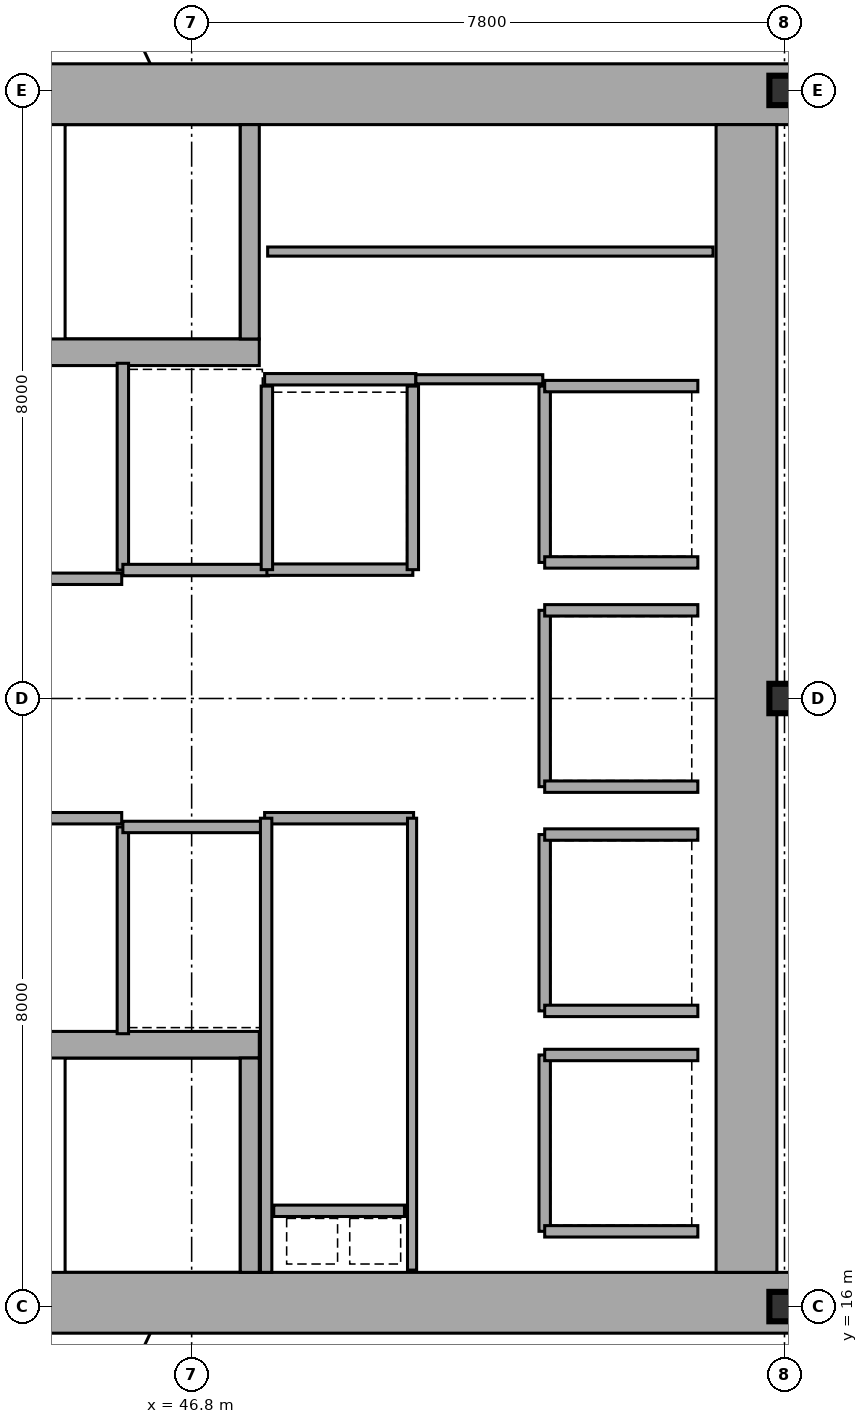
"""IFC4 building model, lengths in metres.
Left out: names, types, materials, properties, quantities, classifications, styles, units other than length and angle.
Written with IfcOpenShell. Run it as: python <this file> out.ifc"""

import sys

from ifc_helpers import new_model, si_unit, direction, frame, frame_2d, origin, origin_2d, place, context, subcontext, project, spatial, rectangle, i_section, extrude, element, fill, save


model = new_model("IFC4")
c1 = context("Model", 3, precision=1e-05, world=origin(), true_north=direction((0.0, 1.0)))
c2 = subcontext(c1, "Body", "Model", "MODEL_VIEW")
j1 = project(units=[si_unit("LENGTHUNIT", "METRE"), si_unit("PLANEANGLEUNIT", "RADIAN")], contexts=[c1])
p1 = place(None, origin())
s1 = spatial("IfcSite", under=j1, at=p1, CompositionType="ELEMENT")
p2 = place(p1, origin())
s2 = spatial("IfcBuilding", under=s1, at=p2, CompositionType="ELEMENT")
p3 = place(p2, frame((0.0, 0.0, 112.05)))
s3 = spatial("IfcBuildingStorey", under=s2, at=p3, CompositionType="ELEMENT", Elevation=112.05)
for number, where, z_axis, x_axis in (
    (1, (38.8, 31.95, 0.0), (0.0, 0.0, 1.0), (1.0, 0.0, 0.0)),
    (2, (38.8, 16.05, 0.0), (0.0, 0.0, 1.0), (1.0, 0.0, 0.0)),
):
    element("IfcWall", number, at=place(p3, frame(where, z_axis=z_axis, x_axis=x_axis)), inside=s3, PredefinedType="SHEAR", context=c2, shape_type="SweptSolid", body=[
        extrude(rectangle(XDim=16.0, YDim=0.8, at=frame_2d((8.0, 0.0))), origin(), (0.0, 0.0, 1.0), 4.56),
    ])
p4 = place(p3, frame((54.1, 16.45, 0.0), z_axis=(0.0, 0.0, 1.0), x_axis=(0.0, 1.0, 0.0)))
e3 = element("IfcWall", 3, at=p4, inside=s3, PredefinedType="SHEAR", context=c2, shape_type="SweptSolid", body=[
    extrude(rectangle(XDim=15.1, YDim=0.8, at=frame_2d((7.55, 0.0))), origin(), (0.0, 0.0, 1.0), 4.56),
])
p5 = place(p3, frame((39.98, 28.555, 0.0), z_axis=(0.0, 0.0, 1.0), x_axis=(1.0, 0.0, 0.0)))
e4 = element("IfcWall", 4, at=p5, inside=s3, PredefinedType="SHEAR", context=c2, shape_type="SweptSolid", body=[
    extrude(rectangle(XDim=7.71, YDim=0.35, at=frame_2d((3.855, 0.0))), origin(), (0.0, 0.0, 1.0), 4.56),
])
p6 = place(p5, frame((0.25, 0.0, 0.0)))
e5 = element("IfcOpeningElement", 5, at=p6, cuts=e4, PredefinedType="OPENING", context=c2, shape_type="SweptSolid", body=[
    extrude(rectangle(XDim=1.1, YDim=2.15, at=frame_2d((0.55, 1.075))), frame((0.0, 0.185, 0.0), z_axis=(0.0, -1.0, 0.0), x_axis=(1.0, 0.0, 0.0)), (0.0, 0.0, 1.0), 0.37),
])
p7 = place(p3, frame((39.98, 19.445, 0.0), z_axis=(0.0, 0.0, 1.0), x_axis=(1.0, 0.0, 0.0)))
e6 = element("IfcWall", 6, at=p7, inside=s3, PredefinedType="SHEAR", context=c2, shape_type="SweptSolid", body=[
    extrude(rectangle(XDim=7.71, YDim=0.35, at=frame_2d((3.855, 0.0))), origin(), (0.0, 0.0, 1.0), 4.56),
])
p8 = place(p7, frame((0.25, 0.0, 0.0)))
e7 = element("IfcOpeningElement", 7, at=p8, cuts=e6, PredefinedType="OPENING", context=c2, shape_type="SweptSolid", body=[
    extrude(rectangle(XDim=1.1, YDim=2.15, at=frame_2d((0.55, 1.075))), frame((0.0, 0.185, 0.0), z_axis=(0.0, -1.0, 0.0), x_axis=(1.0, 0.0, 0.0)), (0.0, 0.0, 1.0), 0.37),
])
for number, where, z_axis, x_axis in (
    (8, (47.565, 28.73, 0.0), (0.0, 0.0, 1.0), (0.0, 1.0, 0.0)),
    (9, (47.565, 16.45, 0.0), (0.0, 0.0, 1.0), (0.0, 1.0, 0.0)),
):
    element("IfcWall", number, at=place(p3, frame(where, z_axis=z_axis, x_axis=x_axis)), inside=s3, PredefinedType="SHEAR", context=c2, shape_type="SweptSolid", body=[
        extrude(rectangle(XDim=2.82, YDim=0.25, at=frame_2d((1.41, 0.0))), origin(), (0.0, 0.0, 1.0), 4.56),
    ])
for number, where, z_axis, x_axis in (
    (10, (54.6, 16.0, 0.0), (0.0, 0.0, 1.0), (1.0, 0.0, 0.0)),
    (11, (54.6, 24.0, 0.0), (0.0, 0.0, 1.0), (1.0, 0.0, 0.0)),
    (12, (54.6, 32.0, 0.0), (0.0, 0.0, 1.0), (1.0, 0.0, 0.0)),
):
    element("IfcColumn", number, at=place(p3, frame(where, z_axis=z_axis, x_axis=x_axis)), inside=s3, PredefinedType="COLUMN", context=c2, shape_type="SweptSolid", body=[
        extrude(i_section(OverallWidth=0.398, OverallDepth=0.387, WebThickness=0.021, FlangeThickness=0.033, at=origin_2d()), origin(), (0.0, 0.0, 1.0), 4.794),
    ])
p9 = place(p3, frame((39.98, 25.575, 0.0), z_axis=(0.0, 0.0, 1.0), x_axis=(1.0, 0.0, 0.0)))
e13 = element("IfcWall", 13, at=p9, inside=s3, PredefinedType="PARTITIONING", context=c2, shape_type="SweptSolid", body=[
    extrude(rectangle(XDim=5.9, YDim=0.15, at=frame_2d((2.95, 0.0))), origin(), (0.0, 0.0, 1.0), 4.56),
])
p10 = place(p9, frame((2.35, 0.0, 0.0)))
e14 = element("IfcOpeningElement", 14, at=p10, cuts=e13, PredefinedType="OPENING", context=c2, shape_type="SweptSolid", body=[
    extrude(rectangle(XDim=1.05, YDim=2.15, at=frame_2d((0.525, 1.075))), frame((0.0, 0.085, 0.0), z_axis=(0.0, -1.0, 0.0), x_axis=(1.0, 0.0, 0.0)), (0.0, 0.0, 1.0), 0.17),
])
p11 = place(p3, frame((39.98, 22.425, 0.0), z_axis=(0.0, 0.0, 1.0), x_axis=(1.0, 0.0, 0.0)))
e15 = element("IfcWall", 15, at=p11, inside=s3, PredefinedType="PARTITIONING", context=c2, shape_type="SweptSolid", body=[
    extrude(rectangle(XDim=5.9, YDim=0.15, at=frame_2d((2.95, 0.0))), origin(), (0.0, 0.0, 1.0), 4.56),
])
p12 = place(p11, frame((2.35, 0.0, 0.0)))
e16 = element("IfcOpeningElement", 16, at=p12, cuts=e15, PredefinedType="OPENING", context=c2, shape_type="SweptSolid", body=[
    extrude(rectangle(XDim=1.05, YDim=2.15, at=frame_2d((0.525, 1.075))), frame((0.0, 0.085, 0.0), z_axis=(0.0, -1.0, 0.0), x_axis=(1.0, 0.0, 0.0)), (0.0, 0.0, 1.0), 0.17),
])
p13 = place(p3, frame((45.895, 25.69, 0.0), z_axis=(0.0, 0.0, 1.0), x_axis=(0.0, 1.0, 0.0)))
e17 = element("IfcWall", 17, at=p13, inside=s3, PredefinedType="PARTITIONING", context=c2, shape_type="SweptSolid", body=[
    extrude(rectangle(XDim=2.72, YDim=0.15, at=frame_2d((1.36, 0.0))), origin(), (0.0, 0.0, 1.0), 4.56),
])
p14 = place(p13, frame((0.81, 0.0, 0.0)))
e18 = element("IfcOpeningElement", 18, at=p14, cuts=e17, PredefinedType="OPENING", context=c2, shape_type="SweptSolid", body=[
    extrude(rectangle(XDim=1.1, YDim=2.15, at=frame_2d((0.55, 1.075))), frame((0.0, 0.085, 0.0), z_axis=(0.0, -1.0, 0.0), x_axis=(1.0, 0.0, 0.0)), (0.0, 0.0, 1.0), 0.17),
])
p15 = place(p3, frame((45.895, 25.69, 0.0), z_axis=(0.0, 0.0, 1.0), x_axis=(1.0, 0.0, 0.0)))
e19 = element("IfcWall", 19, at=p15, inside=s3, PredefinedType="PARTITIONING", context=c2, shape_type="SweptSolid", body=[
    extrude(rectangle(XDim=1.915, YDim=0.15, at=frame_2d((0.958, 0.0))), origin(), (0.0, 0.0, 1.0), 4.56),
])
p16 = place(p3, frame((45.895, 19.59, 0.0), z_axis=(0.0, 0.0, 1.0), x_axis=(0.0, 1.0, 0.0)))
e20 = element("IfcWall", 20, at=p16, inside=s3, PredefinedType="PARTITIONING", context=c2, shape_type="SweptSolid", body=[
    extrude(rectangle(XDim=2.72, YDim=0.15, at=frame_2d((1.36, 0.0))), origin(), (0.0, 0.0, 1.0), 4.56),
])
p17 = place(p16, frame((0.81, 0.0, 0.0)))
e21 = element("IfcOpeningElement", 21, at=p17, cuts=e20, PredefinedType="OPENING", context=c2, shape_type="SweptSolid", body=[
    extrude(rectangle(XDim=1.1, YDim=2.15, at=frame_2d((0.55, 1.075))), frame((0.0, 0.085, 0.0), z_axis=(0.0, -1.0, 0.0), x_axis=(1.0, 0.0, 0.0)), (0.0, 0.0, 1.0), 0.17),
])
p18 = place(p3, frame((45.895, 22.31, 0.0), z_axis=(0.0, 0.0, 1.0), x_axis=(1.0, 0.0, 0.0)))
e22 = element("IfcWall", 22, at=p18, inside=s3, PredefinedType="PARTITIONING", context=c2, shape_type="SweptSolid", body=[
    extrude(rectangle(XDim=1.915, YDim=0.15, at=frame_2d((0.958, 0.0))), origin(), (0.0, 0.0, 1.0), 4.56),
])
p19 = place(p3, frame((47.79, 25.695, 0.0), z_axis=(0.0, 0.0, 1.0), x_axis=(1.0, 0.0, 0.0)))
e23 = element("IfcWall", 23, at=p19, inside=s3, PredefinedType="PARTITIONING", context=c2, shape_type="SweptSolid", body=[
    extrude(rectangle(XDim=1.92, YDim=0.15, at=frame_2d((0.96, 0.0))), origin(), (0.0, 0.0, 1.0), 4.56),
])
p20 = place(p19, frame((0.41, 0.0, 0.0)))
e24 = element("IfcOpeningElement", 24, at=p20, cuts=e23, PredefinedType="OPENING", context=c2, shape_type="SweptSolid", body=[
    extrude(rectangle(XDim=1.1, YDim=2.15, at=frame_2d((0.55, 1.075))), frame((0.0, 0.085, 0.0), z_axis=(0.0, -1.0, 0.0), x_axis=(1.0, 0.0, 0.0)), (0.0, 0.0, 1.0), 0.17),
])
for number, where, z_axis, x_axis in (
    (25, (47.79, 25.695, 0.0), (0.0, 0.0, 1.0), (0.0, 1.0, 0.0)),
    (26, (49.71, 25.695, 0.0), (0.0, 0.0, 1.0), (0.0, 1.0, 0.0)),
):
    element("IfcWall", number, at=place(p3, frame(where, z_axis=z_axis, x_axis=x_axis)), inside=s3, PredefinedType="PARTITIONING", context=c2, shape_type="SweptSolid", body=[
        extrude(rectangle(XDim=2.415, YDim=0.15, at=frame_2d((1.208, 0.0))), origin(), (0.0, 0.0, 1.0), 4.56),
    ])
p21 = place(p3, frame((51.445, 25.79, 0.0), z_axis=(0.0, 0.0, 1.0), x_axis=(0.0, 1.0, 0.0)))
e27 = element("IfcWall", 27, at=p21, inside=s3, PredefinedType="PARTITIONING", context=c2, shape_type="SweptSolid", body=[
    extrude(rectangle(XDim=2.32, YDim=0.15, at=frame_2d((1.16, 0.0))), origin(), (0.0, 0.0, 1.0), 4.56),
])
p22 = place(p21, frame((0.61, 0.0, 0.0)))
e28 = element("IfcOpeningElement", 28, at=p22, cuts=e27, PredefinedType="OPENING", context=c2, shape_type="SweptSolid", body=[
    extrude(rectangle(XDim=1.1, YDim=2.15, at=frame_2d((0.55, 1.075))), frame((0.0, 0.085, 0.0), z_axis=(0.0, -1.0, 0.0), x_axis=(1.0, 0.0, 0.0)), (0.0, 0.0, 1.0), 0.17),
])
for number, where, z_axis, x_axis in (
    (29, (51.445, 25.79, 0.0), (0.0, 0.0, 1.0), (1.0, 0.0, 0.0)),
    (30, (51.445, 28.11, 0.0), (0.0, 0.0, 1.0), (1.0, 0.0, 0.0)),
):
    element("IfcWall", number, at=place(p3, frame(where, z_axis=z_axis, x_axis=x_axis)), inside=s3, PredefinedType="PARTITIONING", context=c2, shape_type="SweptSolid", body=[
        extrude(rectangle(XDim=2.015, YDim=0.15, at=frame_2d((1.007, 0.0))), origin(), (0.0, 0.0, 1.0), 4.56),
    ])
p23 = place(p3, frame((51.445, 19.89, 0.0), z_axis=(0.0, 0.0, 1.0), x_axis=(0.0, 1.0, 0.0)))
e31 = element("IfcWall", 31, at=p23, inside=s3, PredefinedType="PARTITIONING", context=c2, shape_type="SweptSolid", body=[
    extrude(rectangle(XDim=2.32, YDim=0.15, at=frame_2d((1.16, 0.0))), origin(), (0.0, 0.0, 1.0), 4.56),
])
p24 = place(p23, frame((0.61, 0.0, 0.0)))
e32 = element("IfcOpeningElement", 32, at=p24, cuts=e31, PredefinedType="OPENING", context=c2, shape_type="SweptSolid", body=[
    extrude(rectangle(XDim=1.1, YDim=2.15, at=frame_2d((0.55, 1.075))), frame((0.0, 0.085, 0.0), z_axis=(0.0, -1.0, 0.0), x_axis=(1.0, 0.0, 0.0)), (0.0, 0.0, 1.0), 0.17),
])
for number, where, z_axis, x_axis in (
    (33, (51.445, 19.89, 0.0), (0.0, 0.0, 1.0), (1.0, 0.0, 0.0)),
    (34, (51.445, 22.21, 0.0), (0.0, 0.0, 1.0), (1.0, 0.0, 0.0)),
):
    element("IfcWall", number, at=place(p3, frame(where, z_axis=z_axis, x_axis=x_axis)), inside=s3, PredefinedType="PARTITIONING", context=c2, shape_type="SweptSolid", body=[
        extrude(rectangle(XDim=2.015, YDim=0.15, at=frame_2d((1.007, 0.0))), origin(), (0.0, 0.0, 1.0), 4.56),
    ])
p25 = place(p3, frame((51.445, 22.84, 0.0), z_axis=(0.0, 0.0, 1.0), x_axis=(0.0, 1.0, 0.0)))
e35 = element("IfcWall", 35, at=p25, inside=s3, PredefinedType="PARTITIONING", context=c2, shape_type="SweptSolid", body=[
    extrude(rectangle(XDim=2.32, YDim=0.15, at=frame_2d((1.16, 0.0))), origin(), (0.0, 0.0, 1.0), 4.56),
])
for number, where, z_axis, x_axis in (
    (36, (51.445, 22.84, 0.0), (0.0, 0.0, 1.0), (1.0, 0.0, 0.0)),
    (37, (51.445, 25.16, 0.0), (0.0, 0.0, 1.0), (1.0, 0.0, 0.0)),
):
    element("IfcWall", number, at=place(p3, frame(where, z_axis=z_axis, x_axis=x_axis)), inside=s3, PredefinedType="PARTITIONING", context=c2, shape_type="SweptSolid", body=[
        extrude(rectangle(XDim=2.015, YDim=0.15, at=frame_2d((1.007, 0.0))), origin(), (0.0, 0.0, 1.0), 4.56),
    ])
p26 = place(p3, frame((51.445, 16.99, 0.0), z_axis=(0.0, 0.0, 1.0), x_axis=(0.0, 1.0, 0.0)))
e38 = element("IfcWall", 38, at=p26, inside=s3, PredefinedType="PARTITIONING", context=c2, shape_type="SweptSolid", body=[
    extrude(rectangle(XDim=2.32, YDim=0.15, at=frame_2d((1.16, 0.0))), origin(), (0.0, 0.0, 1.0), 4.56),
])
p27 = place(p26, frame((0.61, 0.0, 0.0)))
e39 = element("IfcOpeningElement", 39, at=p27, cuts=e38, PredefinedType="OPENING", context=c2, shape_type="SweptSolid", body=[
    extrude(rectangle(XDim=1.1, YDim=2.15, at=frame_2d((0.55, 1.075))), frame((0.0, 0.085, 0.0), z_axis=(0.0, -1.0, 0.0), x_axis=(1.0, 0.0, 0.0)), (0.0, 0.0, 1.0), 0.17),
])
for number, where, z_axis, x_axis in (
    (40, (51.445, 16.99, 0.0), (0.0, 0.0, 1.0), (1.0, 0.0, 0.0)),
    (41, (51.445, 19.31, 0.0), (0.0, 0.0, 1.0), (1.0, 0.0, 0.0)),
):
    element("IfcWall", number, at=place(p3, frame(where, z_axis=z_axis, x_axis=x_axis)), inside=s3, PredefinedType="PARTITIONING", context=c2, shape_type="SweptSolid", body=[
        extrude(rectangle(XDim=2.015, YDim=0.15, at=frame_2d((1.007, 0.0))), origin(), (0.0, 0.0, 1.0), 4.56),
    ])
p28 = place(p3, frame((47.88, 17.26, 0.0), z_axis=(0.0, 0.0, 1.0), x_axis=(1.0, 0.0, 0.0)))
e42 = element("IfcWall", 42, at=p28, inside=s3, PredefinedType="PARTITIONING", context=c2, shape_type="SweptSolid", body=[
    extrude(rectangle(XDim=1.72, YDim=0.15, at=frame_2d((0.86, 0.0))), origin(), (0.0, 0.0, 1.0), 4.56),
])
p29 = place(p28, frame((0.42, 0.0, 0.0)))
e43 = element("IfcOpeningElement", 43, at=p29, cuts=e42, PredefinedType="OPENING", context=c2, shape_type="SweptSolid", body=[
    extrude(rectangle(XDim=0.85, YDim=2.15, at=frame_2d((0.425, 1.075))), frame((0.0, 0.085, 0.0), z_axis=(0.0, -1.0, 0.0), x_axis=(1.0, 0.0, 0.0)), (0.0, 0.0, 1.0), 0.17),
])
p30 = place(p3, frame((47.76, 22.425, 0.0), z_axis=(0.0, 0.0, 1.0), x_axis=(1.0, 0.0, 0.0)))
e44 = element("IfcWall", 44, at=p30, inside=s3, PredefinedType="PARTITIONING", context=c2, shape_type="SweptSolid", body=[
    extrude(rectangle(XDim=1.96, YDim=0.15, at=frame_2d((0.98, 0.0))), origin(), (0.0, 0.0, 1.0), 4.56),
])
p31 = place(p3, frame((47.78, 16.45, 0.0), z_axis=(0.0, 0.0, 1.0), x_axis=(0.0, 1.0, 0.0)))
e45 = element("IfcWall", 45, at=p31, inside=s3, PredefinedType="PARTITIONING", context=c2, shape_type="SweptSolid", body=[
    extrude(rectangle(XDim=5.975, YDim=0.15, at=frame_2d((2.988, 0.0))), origin(), (0.0, 0.0, 1.0), 4.56),
])
p32 = place(p3, frame((49.7, 16.48, 0.0), z_axis=(0.0, 0.0, 1.0), x_axis=(0.0, 1.0, 0.0)))
e46 = element("IfcWall", 46, at=p32, inside=s3, PredefinedType="PARTITIONING", context=c2, shape_type="SweptSolid", body=[
    extrude(rectangle(XDim=5.945, YDim=0.12, at=frame_2d((2.973, 0.0))), origin(), (0.0, 0.0, 1.0), 4.56),
])
p33 = place(p32, frame((3.35, 0.0, 0.0)))
e47 = element("IfcOpeningElement", 47, at=p33, cuts=e46, PredefinedType="OPENING", context=c2, shape_type="SweptSolid", body=[
    extrude(rectangle(XDim=0.95, YDim=2.15, at=frame_2d((0.475, 1.075))), frame((0.0, 0.07, 0.0), z_axis=(0.0, -1.0, 0.0), x_axis=(1.0, 0.0, 0.0)), (0.0, 0.0, 1.0), 0.14),
])
p34 = place(p3, frame((47.76, 28.2, 0.0), z_axis=(0.0, 0.0, 1.0), x_axis=(1.0, 0.0, 0.0)))
e48 = element("IfcWall", 48, at=p34, inside=s3, PredefinedType="PARTITIONING", context=c2, shape_type="SweptSolid", body=[
    extrude(rectangle(XDim=1.99, YDim=0.15, at=frame_2d((0.995, 0.0))), origin(), (0.0, 0.0, 1.0), 4.56),
])
p35 = place(p3, frame((49.75, 28.2, 0.0), z_axis=(0.0, 0.0, 1.0), x_axis=(1.0, 0.0, 0.0)))
e49 = element("IfcWall", 49, at=p35, inside=s3, PredefinedType="PARTITIONING", context=c2, shape_type="SweptSolid", body=[
    extrude(rectangle(XDim=1.67, YDim=0.12, at=frame_2d((0.835, 0.0))), origin(), (0.0, 0.0, 1.0), 4.56),
])
p36 = place(p35, frame((0.42, 0.0, 0.0)))
e50 = element("IfcOpeningElement", 50, at=p36, cuts=e49, PredefinedType="OPENING", context=c2, shape_type="SweptSolid", body=[
    extrude(rectangle(XDim=0.85, YDim=2.15, at=frame_2d((0.425, 1.075))), frame((0.0, 0.07, 0.0), z_axis=(0.0, -1.0, 0.0), x_axis=(1.0, 0.0, 0.0)), (0.0, 0.0, 1.0), 0.14),
])
p37 = place(p3, frame((47.8, 29.88, 0.0), z_axis=(0.0, 0.0, 1.0), x_axis=(1.0, 0.0, 0.0)))
e51 = element("IfcWall", 51, at=p37, inside=s3, PredefinedType="PARTITIONING", context=c2, shape_type="SweptSolid", body=[
    extrude(rectangle(XDim=5.86, YDim=0.12, at=frame_2d((2.93, 0.0))), origin(), (0.0, 0.0, 1.0), 4.56),
])
p38 = place(p37, frame((2.5, 0.0, 0.0)))
e52 = element("IfcOpeningElement", 52, at=p38, cuts=e51, PredefinedType="OPENING", context=c2, shape_type="SweptSolid", body=[
    extrude(rectangle(XDim=0.85, YDim=2.15, at=frame_2d((0.425, 1.075))), frame((0.0, 0.07, 0.0), z_axis=(0.0, -1.0, 0.0), x_axis=(1.0, 0.0, 0.0)), (0.0, 0.0, 1.0), 0.14),
])
p39 = place(p14, frame((1.1, 0.0, 0.0), z_axis=(0.0, 0.0, 1.0), x_axis=(-1.0, 0.0, 0.0)))
e53 = element("IfcDoor", 53, at=p39, inside=s3, OperationType="DOUBLE_DOOR_SLIDING", PredefinedType="DOOR", context=c2, shape_type="SweptSolid", body=[
    extrude(rectangle(XDim=1.1, YDim=2.15, at=frame_2d((0.55, 1.075))), frame((0.0, 0.025, 0.0), z_axis=(0.0, -1.0, 0.0), x_axis=(1.0, 0.0, 0.0)), (0.0, 0.0, 1.0), 0.05),
])
fill(e18, e53)
p40 = place(p17, frame((1.1, 0.0, 0.0), z_axis=(0.0, 0.0, 1.0), x_axis=(-1.0, 0.0, 0.0)))
e54 = element("IfcDoor", 54, at=p40, inside=s3, OperationType="DOUBLE_DOOR_SLIDING", PredefinedType="DOOR", context=c2, shape_type="SweptSolid", body=[
    extrude(rectangle(XDim=1.1, YDim=2.15, at=frame_2d((0.55, 1.075))), frame((0.0, 0.025, 0.0), z_axis=(0.0, -1.0, 0.0), x_axis=(1.0, 0.0, 0.0)), (0.0, 0.0, 1.0), 0.05),
])
fill(e21, e54)
p41 = place(p20, frame((1.1, 0.0, 0.0), z_axis=(0.0, 0.0, 1.0), x_axis=(-1.0, 0.0, 0.0)))
e55 = element("IfcDoor", 55, at=p41, inside=s3, OperationType="DOUBLE_DOOR_SLIDING", PredefinedType="DOOR", context=c2, shape_type="SweptSolid", body=[
    extrude(rectangle(XDim=1.1, YDim=2.15, at=frame_2d((0.55, 1.075))), frame((0.0, 0.025, 0.0), z_axis=(0.0, -1.0, 0.0), x_axis=(1.0, 0.0, 0.0)), (0.0, 0.0, 1.0), 0.05),
])
fill(e24, e55)
p42 = place(p22, frame((1.1, 0.0, 0.0), z_axis=(0.0, 0.0, 1.0), x_axis=(-1.0, 0.0, 0.0)))
e56 = element("IfcDoor", 56, at=p42, inside=s3, OperationType="DOUBLE_DOOR_SLIDING", PredefinedType="DOOR", context=c2, shape_type="SweptSolid", body=[
    extrude(rectangle(XDim=1.1, YDim=2.15, at=frame_2d((0.55, 1.075))), frame((0.0, 0.025, 0.0), z_axis=(0.0, -1.0, 0.0), x_axis=(1.0, 0.0, 0.0)), (0.0, 0.0, 1.0), 0.05),
])
fill(e28, e56)
p43 = place(p24, frame((1.1, 0.0, 0.0), z_axis=(0.0, 0.0, 1.0), x_axis=(-1.0, 0.0, 0.0)))
e57 = element("IfcDoor", 57, at=p43, inside=s3, OperationType="DOUBLE_DOOR_SLIDING", PredefinedType="DOOR", context=c2, shape_type="SweptSolid", body=[
    extrude(rectangle(XDim=1.1, YDim=2.15, at=frame_2d((0.55, 1.075))), frame((0.0, 0.025, 0.0), z_axis=(0.0, -1.0, 0.0), x_axis=(1.0, 0.0, 0.0)), (0.0, 0.0, 1.0), 0.05),
])
fill(e32, e57)
p44 = place(p27, frame((1.1, 0.0, 0.0), z_axis=(0.0, 0.0, 1.0), x_axis=(-1.0, 0.0, 0.0)))
e58 = element("IfcDoor", 58, at=p44, inside=s3, OperationType="DOUBLE_DOOR_SLIDING", PredefinedType="DOOR", context=c2, shape_type="SweptSolid", body=[
    extrude(rectangle(XDim=1.1, YDim=2.15, at=frame_2d((0.55, 1.075))), frame((0.0, 0.025, 0.0), z_axis=(0.0, -1.0, 0.0), x_axis=(1.0, 0.0, 0.0)), (0.0, 0.0, 1.0), 0.05),
])
fill(e39, e58)
p45 = place(p29, origin())
e59 = element("IfcDoor", 59, at=p45, inside=s3, OperationType="SINGLE_SWING_LEFT", PredefinedType="TRAPDOOR", context=c2, shape_type="SweptSolid", body=[
    extrude(rectangle(XDim=0.85, YDim=2.15, at=frame_2d((0.425, 1.075))), frame((0.0, 0.025, 0.0), z_axis=(0.0, -1.0, 0.0), x_axis=(1.0, 0.0, 0.0)), (0.0, 0.0, 1.0), 0.05),
])
fill(e43, e59)
p46 = place(p33, frame((0.95, 0.0, 0.0), z_axis=(0.0, 0.0, 1.0), x_axis=(-1.0, 0.0, 0.0)))
e60 = element("IfcDoor", 60, at=p46, inside=s3, OperationType="SINGLE_SWING_LEFT", PredefinedType="DOOR", context=c2, shape_type="SweptSolid", body=[
    extrude(rectangle(XDim=0.95, YDim=2.15, at=frame_2d((0.475, 1.075))), frame((0.0, 0.025, 0.0), z_axis=(0.0, -1.0, 0.0), x_axis=(1.0, 0.0, 0.0)), (0.0, 0.0, 1.0), 0.05),
])
fill(e47, e60)
p47 = place(p36, origin())
e61 = element("IfcDoor", 61, at=p47, inside=s3, OperationType="SINGLE_SWING_LEFT", PredefinedType="DOOR", context=c2, shape_type="SweptSolid", body=[
    extrude(rectangle(XDim=0.85, YDim=2.15, at=frame_2d((0.425, 1.075))), frame((0.0, 0.025, 0.0), z_axis=(0.0, -1.0, 0.0), x_axis=(1.0, 0.0, 0.0)), (0.0, 0.0, 1.0), 0.05),
])
fill(e50, e61)
p48 = place(p38, origin())
e62 = element("IfcDoor", 62, at=p48, inside=s3, OperationType="SINGLE_SWING_RIGHT", PredefinedType="DOOR", context=c2, shape_type="SweptSolid", body=[
    extrude(rectangle(XDim=0.85, YDim=2.15, at=frame_2d((0.425, 1.075))), frame((0.0, 0.025, 0.0), z_axis=(0.0, -1.0, 0.0), x_axis=(1.0, 0.0, 0.0)), (0.0, 0.0, 1.0), 0.05),
])
fill(e52, e62)
save(model, sys.argv[1])
